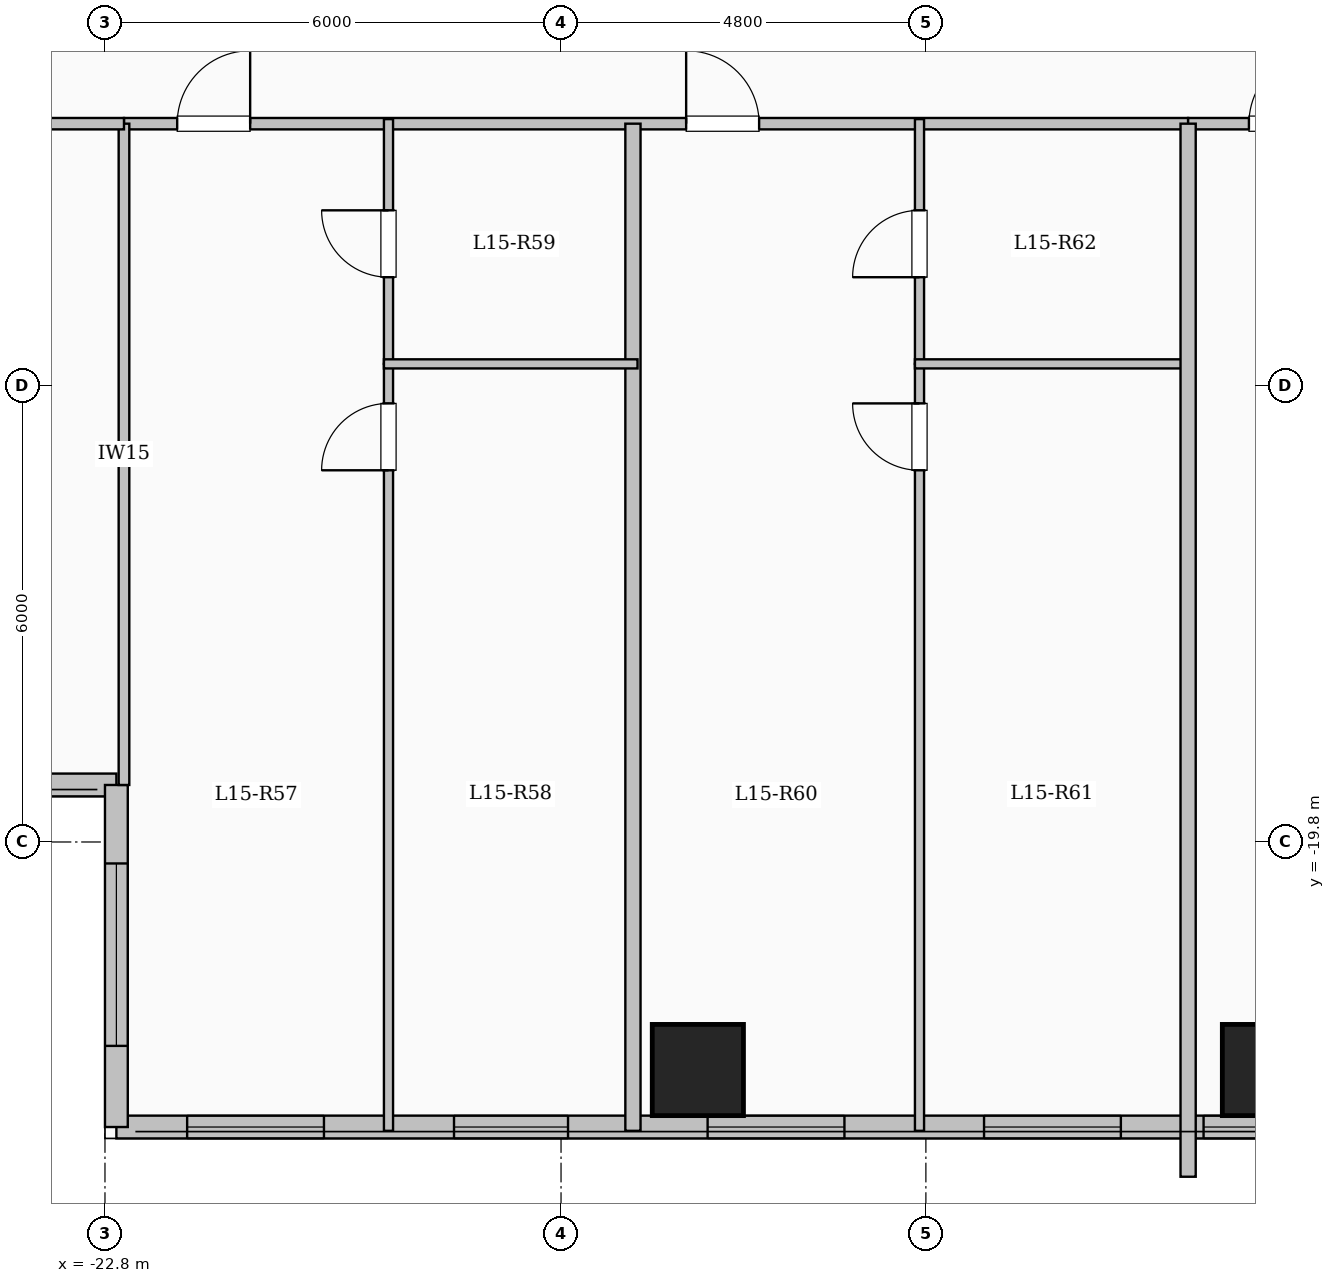
"""IFC4 building model, lengths in metres.
Left out: names, types, materials, properties, quantities, classifications, styles, units other than length and angle.
Written with IfcOpenShell. Run it as: python <this file> out.ifc"""

import sys

from ifc_helpers import new_model, si_unit, direction, frame, frame_2d, origin, origin_2d, place, context, subcontext, project, spatial, rectangle, extrude, element, fill, save


model = new_model("IFC4")
c1 = context("Model", 3, precision=1e-05, world=origin(), true_north=direction((0.0, 1.0)))
c2 = subcontext(c1, "Body", "Model", "MODEL_VIEW")
j1 = project(units=[si_unit("LENGTHUNIT", "METRE"), si_unit("PLANEANGLEUNIT", "RADIAN")], contexts=[c1])
p1 = place(None, origin())
s1 = spatial("IfcSite", under=j1, at=p1, CompositionType="ELEMENT")
p2 = place(p1, origin())
s2 = spatial("IfcBuilding", under=s1, at=p2, CompositionType="ELEMENT")
p3 = place(p2, frame((0.0, 0.0, 57.5)))
s3 = spatial("IfcBuildingStorey", under=s2, at=p3, CompositionType="ELEMENT", Elevation=57.5)
for number, where, z_axis, x_axis in (
    (1, (-15.0, -22.8, 0.0), (0.0, 0.0, 1.0), (1.0, 0.0, 0.0)),
    (2, (-7.5, -22.8, 0.0), (0.0, 0.0, 1.0), (1.0, 0.0, 0.0)),
):
    element("IfcColumn", number, at=place(p3, frame(where, z_axis=z_axis, x_axis=x_axis)), inside=s3, PredefinedType="COLUMN", context=c2, shape_type="SweptSolid", body=[
        extrude(rectangle(XDim=1.2, YDim=1.2, at=origin_2d()), origin(), (0.0, 0.0, 1.0), 3.35),
    ])
p4 = place(p3, frame((-22.65, -19.05, 0.0), z_axis=(0.0, 0.0, 1.0), x_axis=(-1.0, 0.0, 0.0)))
e3 = element("IfcWall", 3, at=p4, inside=s3, PredefinedType="SOLIDWALL", context=c2, shape_type="SweptSolid", body=[
    extrude(rectangle(XDim=6.0, YDim=0.3, at=frame_2d((3.0, 0.0))), origin(), (0.0, 0.0, 1.0), 3.1),
])
p5 = place(p4, frame((1.775, 0.0, 0.9)))
e4 = element("IfcOpeningElement", 4, at=p5, cuts=e3, PredefinedType="OPENING", context=c2, shape_type="SweptSolid", body=[
    extrude(rectangle(XDim=2.4, YDim=1.8, at=frame_2d((1.2, 0.9))), frame((0.0, 0.16, 0.0), z_axis=(0.0, -1.0, 0.0), x_axis=(1.0, 0.0, 0.0)), (0.0, 0.0, 1.0), 0.32),
])
p6 = place(p3, frame((-7.35, -23.55, 0.0), z_axis=(0.0, 0.0, 1.0), x_axis=(-1.0, 0.0, 0.0)))
e5 = element("IfcWall", 5, at=p6, inside=s3, PredefinedType="SOLIDWALL", context=c2, shape_type="SweptSolid", body=[
    extrude(rectangle(XDim=15.3, YDim=0.3, at=frame_2d((7.65, 0.0))), origin(), (0.0, 0.0, 1.0), 3.1),
])
p7 = place(p6, frame((0.147, 0.0, 0.95)))
e6 = element("IfcOpeningElement", 6, at=p7, cuts=e5, PredefinedType="OPENING", context=c2, shape_type="SweptSolid", body=[
    extrude(rectangle(XDim=0.85, YDim=1.5, at=frame_2d((0.425, 0.75))), frame((0.0, 0.16, 0.0), z_axis=(0.0, -1.0, 0.0), x_axis=(1.0, 0.0, 0.0)), (0.0, 0.0, 1.0), 0.32),
])
p8 = place(p6, frame((2.085, 0.0, 0.9)))
e7 = element("IfcOpeningElement", 7, at=p8, cuts=e5, PredefinedType="OPENING", context=c2, shape_type="SweptSolid", body=[
    extrude(rectangle(XDim=1.8, YDim=1.65, at=frame_2d((0.9, 0.825))), frame((0.0, 0.16, 0.0), z_axis=(0.0, -1.0, 0.0), x_axis=(1.0, 0.0, 0.0)), (0.0, 0.0, 1.0), 0.32),
])
p9 = place(p6, frame((5.722, 0.0, 0.9)))
e8 = element("IfcOpeningElement", 8, at=p9, cuts=e5, PredefinedType="OPENING", context=c2, shape_type="SweptSolid", body=[
    extrude(rectangle(XDim=1.8, YDim=1.65, at=frame_2d((0.9, 0.825))), frame((0.0, 0.16, 0.0), z_axis=(0.0, -1.0, 0.0), x_axis=(1.0, 0.0, 0.0)), (0.0, 0.0, 1.0), 0.32),
])
p10 = place(p6, frame((9.358, 0.0, 0.9)))
e9 = element("IfcOpeningElement", 9, at=p10, cuts=e5, PredefinedType="OPENING", context=c2, shape_type="SweptSolid", body=[
    extrude(rectangle(XDim=1.5, YDim=1.65, at=frame_2d((0.75, 0.825))), frame((0.0, 0.16, 0.0), z_axis=(0.0, -1.0, 0.0), x_axis=(1.0, 0.0, 0.0)), (0.0, 0.0, 1.0), 0.32),
])
p11 = place(p6, frame((12.569, 0.0, 0.9)))
e10 = element("IfcOpeningElement", 10, at=p11, cuts=e5, PredefinedType="OPENING", context=c2, shape_type="SweptSolid", body=[
    extrude(rectangle(XDim=1.8, YDim=1.65, at=frame_2d((0.9, 0.825))), frame((0.0, 0.16, 0.0), z_axis=(0.0, -1.0, 0.0), x_axis=(1.0, 0.0, 0.0)), (0.0, 0.0, 1.0), 0.32),
])
p12 = place(p3, frame((-22.65, -23.55, 0.0), z_axis=(0.0, 0.0, 1.0), x_axis=(0.0, 1.0, 0.0)))
e11 = element("IfcWall", 11, at=p12, inside=s3, PredefinedType="SOLIDWALL", context=c2, shape_type="SweptSolid", body=[
    extrude(rectangle(XDim=4.5, YDim=0.3, at=frame_2d((2.25, 0.0))), origin(), (0.0, 0.0, 1.0), 3.1),
])
p13 = place(p12, frame((1.067, 0.0, 0.9)))
e12 = element("IfcOpeningElement", 12, at=p13, cuts=e11, PredefinedType="OPENING", context=c2, shape_type="SweptSolid", body=[
    extrude(rectangle(XDim=2.4, YDim=1.8, at=frame_2d((1.2, 0.9))), frame((0.0, 0.16, 0.0), z_axis=(0.0, -1.0, 0.0), x_axis=(1.0, 0.0, 0.0)), (0.0, 0.0, 1.0), 0.32),
])
p14 = place(p3, frame((-22.55, -10.35, 0.0), z_axis=(0.0, 0.0, 1.0), x_axis=(1.0, 0.0, 0.0)))
e13 = element("IfcWall", 13, at=p14, inside=s3, PredefinedType="PARTITIONING", context=c2, shape_type="SweptSolid", body=[
    extrude(rectangle(XDim=14.0, YDim=0.15, at=frame_2d((7.0, 0.0))), origin(), (0.0, 0.0, 1.0), 3.1),
])
p15 = place(p14, frame((0.7, 0.0, 0.0)))
e14 = element("IfcOpeningElement", 14, at=p15, cuts=e13, PredefinedType="OPENING", context=c2, shape_type="SweptSolid", body=[
    extrude(rectangle(XDim=0.96, YDim=2.15, at=frame_2d((0.48, 1.075))), frame((0.0, 0.085, 0.0), z_axis=(0.0, -1.0, 0.0), x_axis=(1.0, 0.0, 0.0)), (0.0, 0.0, 1.0), 0.17),
])
p16 = place(p14, frame((7.396, 0.0, 0.0)))
e15 = element("IfcOpeningElement", 15, at=p16, cuts=e13, PredefinedType="OPENING", context=c2, shape_type="SweptSolid", body=[
    extrude(rectangle(XDim=0.96, YDim=2.15, at=frame_2d((0.48, 1.075))), frame((0.0, 0.085, 0.0), z_axis=(0.0, -1.0, 0.0), x_axis=(1.0, 0.0, 0.0)), (0.0, 0.0, 1.0), 0.17),
])
p17 = place(p3, frame((-8.55, -10.35, 0.0), z_axis=(0.0, 0.0, 1.0), x_axis=(1.0, 0.0, 0.0)))
e16 = element("IfcWall", 16, at=p17, inside=s3, PredefinedType="PARTITIONING", context=c2, shape_type="SweptSolid", body=[
    extrude(rectangle(XDim=17.1, YDim=0.15, at=frame_2d((8.55, 0.0))), origin(), (0.0, 0.0, 1.0), 3.1),
])
p18 = place(p17, frame((0.8, 0.0, 0.0)))
e17 = element("IfcOpeningElement", 17, at=p18, cuts=e16, PredefinedType="OPENING", context=c2, shape_type="SweptSolid", body=[
    extrude(rectangle(XDim=0.96, YDim=2.15, at=frame_2d((0.48, 1.075))), frame((0.0, 0.085, 0.0), z_axis=(0.0, -1.0, 0.0), x_axis=(1.0, 0.0, 0.0)), (0.0, 0.0, 1.0), 0.17),
])
p19 = place(p17, frame((9.35, 0.0, 0.0)))
e18 = element("IfcOpeningElement", 18, at=p19, cuts=e16, PredefinedType="OPENING", context=c2, shape_type="SweptSolid", body=[
    extrude(rectangle(XDim=0.96, YDim=2.15, at=frame_2d((0.48, 1.075))), frame((0.0, 0.085, 0.0), z_axis=(0.0, -1.0, 0.0), x_axis=(1.0, 0.0, 0.0)), (0.0, 0.0, 1.0), 0.17),
])
p20 = place(p3, frame((-15.854, -23.6, 0.0), z_axis=(0.0, 0.0, 1.0), x_axis=(0.0, 1.0, 0.0)))
e19 = element("IfcWall", 19, at=p20, inside=s3, PredefinedType="SOLIDWALL", context=c2, shape_type="SweptSolid", body=[
    extrude(rectangle(XDim=13.25, YDim=0.2, at=frame_2d((6.625, 0.0))), origin(), (0.0, 0.0, 1.0), 3.1),
])
p21 = place(p3, frame((-19.07, -23.6, 0.0), z_axis=(0.0, 0.0, 1.0), x_axis=(0.0, 1.0, 0.0)))
e20 = element("IfcWall", 20, at=p21, inside=s3, PredefinedType="PARTITIONING", context=c2, shape_type="SweptSolid", body=[
    extrude(rectangle(XDim=10.09, YDim=0.12, at=frame_2d((5.045, 0.0))), origin(), (0.0, 0.0, 1.0), 3.1),
])
p22 = place(p21, frame((8.69, 0.0, 0.0)))
e21 = element("IfcOpeningElement", 21, at=p22, cuts=e20, PredefinedType="OPENING", context=c2, shape_type="SweptSolid", body=[
    extrude(rectangle(XDim=0.88, YDim=2.1, at=frame_2d((0.44, 1.05))), frame((0.0, 0.07, 0.0), z_axis=(0.0, -1.0, 0.0), x_axis=(1.0, 0.0, 0.0)), (0.0, 0.0, 1.0), 0.14),
])
p23 = place(p3, frame((-19.07, -13.51, 0.0), z_axis=(0.0, 0.0, 1.0), x_axis=(0.0, 1.0, 0.0)))
e22 = element("IfcWall", 22, at=p23, inside=s3, PredefinedType="PARTITIONING", context=c2, shape_type="SweptSolid", body=[
    extrude(rectangle(XDim=3.22, YDim=0.12, at=frame_2d((1.61, 0.0))), origin(), (0.0, 0.0, 1.0), 3.1),
])
p24 = place(p23, frame((1.14, 0.0, 0.0)))
e23 = element("IfcOpeningElement", 23, at=p24, cuts=e22, PredefinedType="OPENING", context=c2, shape_type="SweptSolid", body=[
    extrude(rectangle(XDim=0.88, YDim=2.1, at=frame_2d((0.44, 1.05))), frame((0.0, 0.07, 0.0), z_axis=(0.0, -1.0, 0.0), x_axis=(1.0, 0.0, 0.0)), (0.0, 0.0, 1.0), 0.14),
])
p25 = place(p3, frame((-19.13, -13.51, 0.0), z_axis=(0.0, 0.0, 1.0), x_axis=(1.0, 0.0, 0.0)))
e24 = element("IfcWall", 24, at=p25, inside=s3, PredefinedType="PARTITIONING", context=c2, shape_type="SweptSolid", body=[
    extrude(rectangle(XDim=3.336, YDim=0.12, at=frame_2d((1.668, 0.0))), origin(), (0.0, 0.0, 1.0), 3.1),
])
p26 = place(p3, frame((-12.084, -23.6, 0.0), z_axis=(0.0, 0.0, 1.0), x_axis=(0.0, 1.0, 0.0)))
e25 = element("IfcWall", 25, at=p26, inside=s3, PredefinedType="PARTITIONING", context=c2, shape_type="SweptSolid", body=[
    extrude(rectangle(XDim=10.09, YDim=0.12, at=frame_2d((5.045, 0.0))), origin(), (0.0, 0.0, 1.0), 3.1),
])
p27 = place(p26, frame((8.69, 0.0, 0.0)))
e26 = element("IfcOpeningElement", 26, at=p27, cuts=e25, PredefinedType="OPENING", context=c2, shape_type="SweptSolid", body=[
    extrude(rectangle(XDim=0.88, YDim=2.1, at=frame_2d((0.44, 1.05))), frame((0.0, 0.07, 0.0), z_axis=(0.0, -1.0, 0.0), x_axis=(1.0, 0.0, 0.0)), (0.0, 0.0, 1.0), 0.14),
])
p28 = place(p3, frame((-12.084, -13.51, 0.0), z_axis=(0.0, 0.0, 1.0), x_axis=(0.0, 1.0, 0.0)))
e27 = element("IfcWall", 27, at=p28, inside=s3, PredefinedType="PARTITIONING", context=c2, shape_type="SweptSolid", body=[
    extrude(rectangle(XDim=3.22, YDim=0.12, at=frame_2d((1.61, 0.0))), origin(), (0.0, 0.0, 1.0), 3.1),
])
p29 = place(p28, frame((1.14, 0.0, 0.0)))
e28 = element("IfcOpeningElement", 28, at=p29, cuts=e27, PredefinedType="OPENING", context=c2, shape_type="SweptSolid", body=[
    extrude(rectangle(XDim=0.88, YDim=2.1, at=frame_2d((0.44, 1.05))), frame((0.0, 0.07, 0.0), z_axis=(0.0, -1.0, 0.0), x_axis=(1.0, 0.0, 0.0)), (0.0, 0.0, 1.0), 0.14),
])
p30 = place(p3, frame((-12.144, -13.51, 0.0), z_axis=(0.0, 0.0, 1.0), x_axis=(1.0, 0.0, 0.0)))
e29 = element("IfcWall", 29, at=p30, inside=s3, PredefinedType="PARTITIONING", context=c2, shape_type="SweptSolid", body=[
    extrude(rectangle(XDim=3.604, YDim=0.12, at=frame_2d((1.802, 0.0))), origin(), (0.0, 0.0, 1.0), 3.1),
])
p31 = place(p3, frame((-8.55, -24.204, 0.0), z_axis=(0.0, 0.0, 1.0), x_axis=(0.0, 1.0, 0.0)))
e30 = element("IfcWall", 30, at=p31, inside=s3, PredefinedType="SOLIDWALL", context=c2, shape_type="SweptSolid", body=[
    extrude(rectangle(XDim=13.854, YDim=0.2, at=frame_2d((6.927, 0.0))), origin(), (0.0, 0.0, 1.0), 3.1),
])
p32 = place(p3, frame((-22.55, -19.05, 0.0), z_axis=(0.0, 0.0, 1.0), x_axis=(0.0, 1.0, 0.0)))
e31 = element("IfcWall", 31, at=p32, inside=s3, PredefinedType="PARTITIONING", context=c2, shape_type="SweptSolid", body=[
    extrude(rectangle(XDim=8.7, YDim=0.14, at=frame_2d((4.35, 0.0))), origin(), (0.0, 0.0, 1.0), 3.1),
])
p33 = place(p3, frame((-28.68, -10.35, 0.0), z_axis=(0.0, 0.0, 1.0), x_axis=(1.0, 0.0, 0.0)))
e32 = element("IfcWall", 32, at=p33, inside=s3, PredefinedType="PARTITIONING", context=c2, shape_type="SweptSolid", body=[
    extrude(rectangle(XDim=6.13, YDim=0.15, at=frame_2d((3.065, 0.0))), origin(), (0.0, 0.0, 1.0), 3.1),
])
p34 = place(p33, frame((2.59, 0.0, 0.0)))
e33 = element("IfcOpeningElement", 33, at=p34, cuts=e32, PredefinedType="OPENING", context=c2, shape_type="SweptSolid", body=[
    extrude(rectangle(XDim=0.95, YDim=2.15, at=frame_2d((0.475, 1.075))), frame((0.0, 0.085, 0.0), z_axis=(0.0, -1.0, 0.0), x_axis=(1.0, 0.0, 0.0)), (0.0, 0.0, 1.0), 0.17),
])
p35 = place(p7, origin())
e34 = element("IfcWindow", 34, at=p35, inside=s3, PartitioningType="SINGLE_PANEL", PredefinedType="WINDOW", context=c2, shape_type="SweptSolid", body=[
    extrude(rectangle(XDim=0.85, YDim=1.5, at=frame_2d((0.425, 0.75))), frame((0.0, 0.03, 0.0), z_axis=(0.0, -1.0, 0.0), x_axis=(1.0, 0.0, 0.0)), (0.0, 0.0, 1.0), 0.06),
])
fill(e6, e34)
p36 = place(p8, origin())
e35 = element("IfcWindow", 35, at=p36, inside=s3, PartitioningType="SINGLE_PANEL", PredefinedType="WINDOW", context=c2, shape_type="SweptSolid", body=[
    extrude(rectangle(XDim=1.8, YDim=1.65, at=frame_2d((0.9, 0.825))), frame((0.0, 0.03, 0.0), z_axis=(0.0, -1.0, 0.0), x_axis=(1.0, 0.0, 0.0)), (0.0, 0.0, 1.0), 0.06),
])
fill(e7, e35)
p37 = place(p9, origin())
e36 = element("IfcWindow", 36, at=p37, inside=s3, PartitioningType="SINGLE_PANEL", PredefinedType="WINDOW", context=c2, shape_type="SweptSolid", body=[
    extrude(rectangle(XDim=1.8, YDim=1.65, at=frame_2d((0.9, 0.825))), frame((0.0, 0.03, 0.0), z_axis=(0.0, -1.0, 0.0), x_axis=(1.0, 0.0, 0.0)), (0.0, 0.0, 1.0), 0.06),
])
fill(e8, e36)
p38 = place(p10, origin())
e37 = element("IfcWindow", 37, at=p38, inside=s3, PartitioningType="SINGLE_PANEL", PredefinedType="WINDOW", context=c2, shape_type="SweptSolid", body=[
    extrude(rectangle(XDim=1.5, YDim=1.65, at=frame_2d((0.75, 0.825))), frame((0.0, 0.03, 0.0), z_axis=(0.0, -1.0, 0.0), x_axis=(1.0, 0.0, 0.0)), (0.0, 0.0, 1.0), 0.06),
])
fill(e9, e37)
p39 = place(p11, origin())
e38 = element("IfcWindow", 38, at=p39, inside=s3, PartitioningType="SINGLE_PANEL", PredefinedType="WINDOW", context=c2, shape_type="SweptSolid", body=[
    extrude(rectangle(XDim=1.8, YDim=1.65, at=frame_2d((0.9, 0.825))), frame((0.0, 0.03, 0.0), z_axis=(0.0, -1.0, 0.0), x_axis=(1.0, 0.0, 0.0)), (0.0, 0.0, 1.0), 0.06),
])
fill(e10, e38)
p40 = place(p13, origin())
e39 = element("IfcWindow", 39, at=p40, inside=s3, PartitioningType="SINGLE_PANEL", PredefinedType="WINDOW", context=c2, shape_type="SweptSolid", body=[
    extrude(rectangle(XDim=2.4, YDim=1.8, at=frame_2d((1.2, 0.9))), frame((0.0, 0.03, 0.0), z_axis=(0.0, -1.0, 0.0), x_axis=(1.0, 0.0, 0.0)), (0.0, 0.0, 1.0), 0.06),
])
fill(e12, e39)
p41 = place(p15, origin())
e40 = element("IfcDoor", 40, at=p41, inside=s3, OperationType="SINGLE_SWING_RIGHT", PredefinedType="DOOR", context=c2, shape_type="SweptSolid", body=[
    extrude(rectangle(XDim=0.96, YDim=2.15, at=frame_2d((0.48, 1.075))), frame((0.0, 0.025, 0.0), z_axis=(0.0, -1.0, 0.0), x_axis=(1.0, 0.0, 0.0)), (0.0, 0.0, 1.0), 0.05),
])
fill(e14, e40)
p42 = place(p22, origin())
e41 = element("IfcDoor", 41, at=p42, inside=s3, OperationType="SINGLE_SWING_LEFT", PredefinedType="DOOR", context=c2, shape_type="SweptSolid", body=[
    extrude(rectangle(XDim=0.88, YDim=2.1, at=frame_2d((0.44, 1.05))), frame((0.0, 0.025, 0.0), z_axis=(0.0, -1.0, 0.0), x_axis=(1.0, 0.0, 0.0)), (0.0, 0.0, 1.0), 0.05),
])
fill(e21, e41)
p43 = place(p24, origin())
e42 = element("IfcDoor", 42, at=p43, inside=s3, OperationType="SINGLE_SWING_RIGHT", PredefinedType="DOOR", context=c2, shape_type="SweptSolid", body=[
    extrude(rectangle(XDim=0.88, YDim=2.1, at=frame_2d((0.44, 1.05))), frame((0.0, 0.025, 0.0), z_axis=(0.0, -1.0, 0.0), x_axis=(1.0, 0.0, 0.0)), (0.0, 0.0, 1.0), 0.05),
])
fill(e23, e42)
p44 = place(p16, origin())
e43 = element("IfcDoor", 43, at=p44, inside=s3, OperationType="SINGLE_SWING_LEFT", PredefinedType="DOOR", context=c2, shape_type="SweptSolid", body=[
    extrude(rectangle(XDim=0.96, YDim=2.15, at=frame_2d((0.48, 1.075))), frame((0.0, 0.025, 0.0), z_axis=(0.0, -1.0, 0.0), x_axis=(1.0, 0.0, 0.0)), (0.0, 0.0, 1.0), 0.05),
])
fill(e15, e43)
p45 = place(p27, origin())
e44 = element("IfcDoor", 44, at=p45, inside=s3, OperationType="SINGLE_SWING_RIGHT", PredefinedType="DOOR", context=c2, shape_type="SweptSolid", body=[
    extrude(rectangle(XDim=0.88, YDim=2.1, at=frame_2d((0.44, 1.05))), frame((0.0, 0.025, 0.0), z_axis=(0.0, -1.0, 0.0), x_axis=(1.0, 0.0, 0.0)), (0.0, 0.0, 1.0), 0.05),
])
fill(e26, e44)
p46 = place(p29, origin())
e45 = element("IfcDoor", 45, at=p46, inside=s3, OperationType="SINGLE_SWING_LEFT", PredefinedType="DOOR", context=c2, shape_type="SweptSolid", body=[
    extrude(rectangle(XDim=0.88, YDim=2.1, at=frame_2d((0.44, 1.05))), frame((0.0, 0.025, 0.0), z_axis=(0.0, -1.0, 0.0), x_axis=(1.0, 0.0, 0.0)), (0.0, 0.0, 1.0), 0.05),
])
fill(e28, e45)
p47 = place(p18, origin())
e46 = element("IfcDoor", 46, at=p47, inside=s3, OperationType="SINGLE_SWING_RIGHT", PredefinedType="DOOR", context=c2, shape_type="SweptSolid", body=[
    extrude(rectangle(XDim=0.96, YDim=2.15, at=frame_2d((0.48, 1.075))), frame((0.0, 0.025, 0.0), z_axis=(0.0, -1.0, 0.0), x_axis=(1.0, 0.0, 0.0)), (0.0, 0.0, 1.0), 0.05),
])
fill(e17, e46)
save(model, sys.argv[1])
